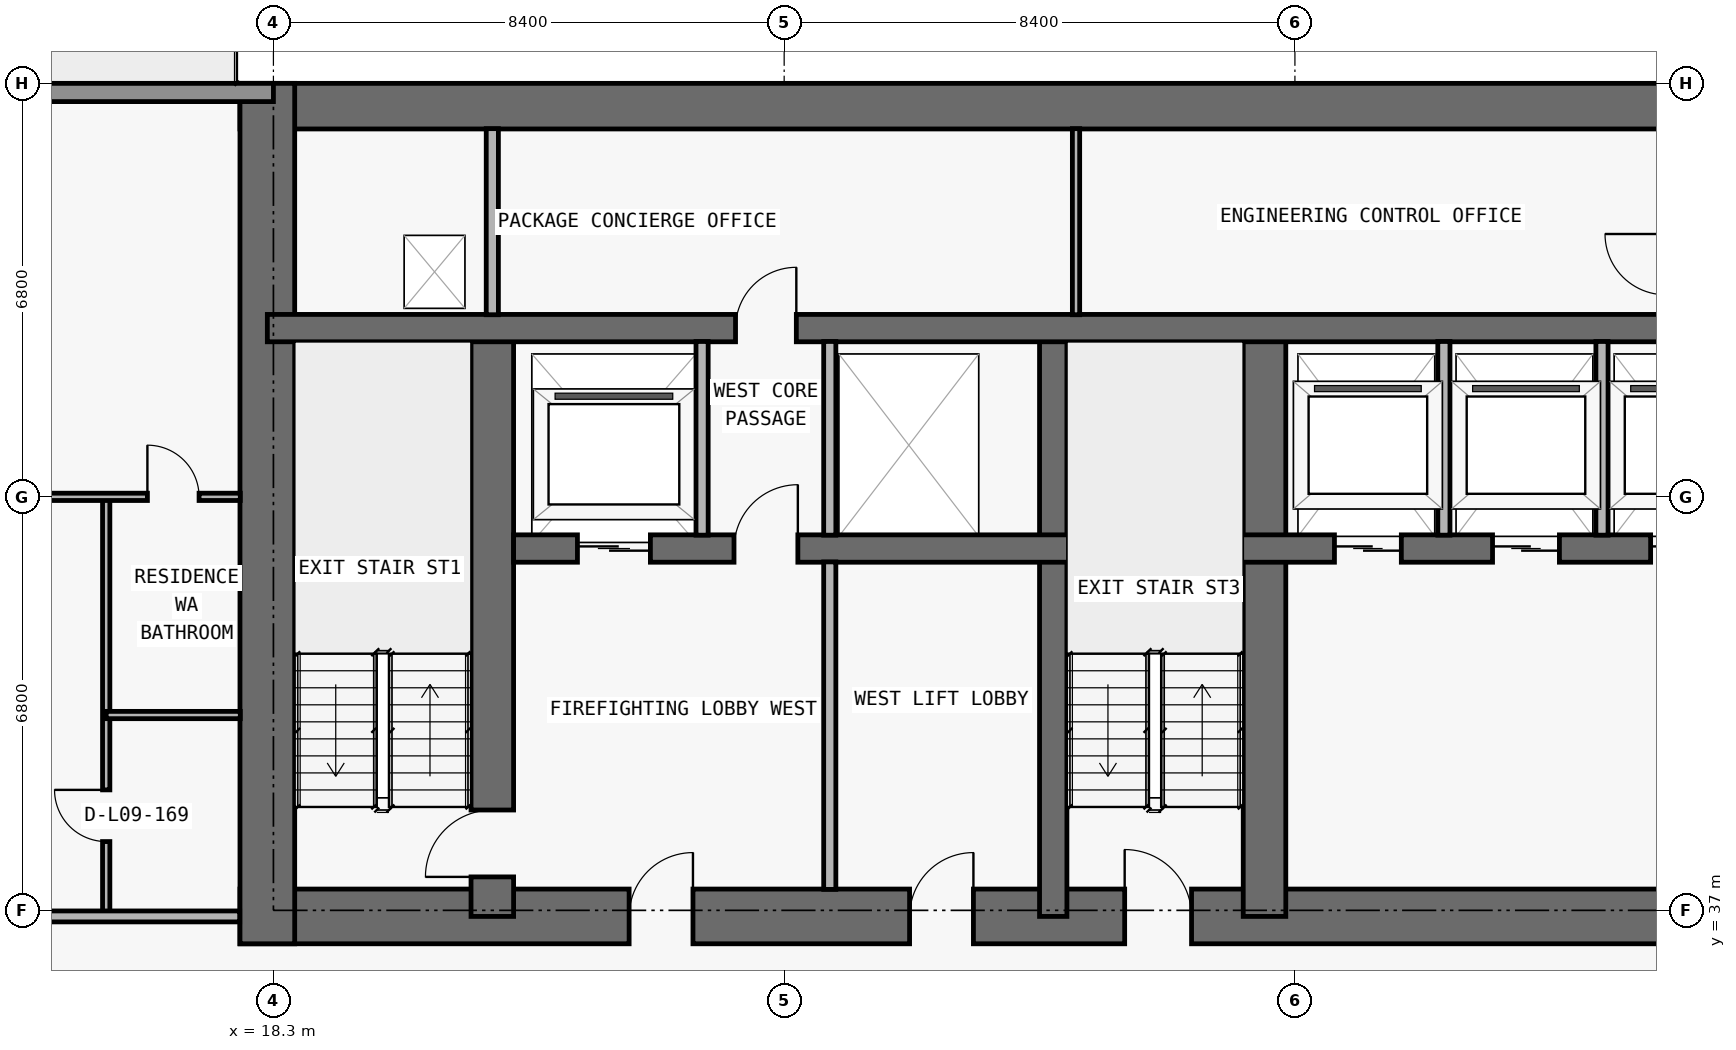
"""IFC4 building model, lengths in metres.
Left out: names, types, materials, properties, quantities, classifications, styles, units other than length and angle.
Written with IfcOpenShell. Run it as: python <this file> out.ifc"""

import sys

from ifc_helpers import new_model, si_unit, direction, frame, frame_2d, origin, place, context, subcontext, project, spatial, rectangle, extrude, element, fill, save


model = new_model("IFC4")
c1 = context("Model", 3, precision=1e-05, world=origin(), true_north=direction((0.0, 1.0)))
c2 = subcontext(c1, "Body", "Model", "MODEL_VIEW")
j1 = project(units=[si_unit("LENGTHUNIT", "METRE"), si_unit("PLANEANGLEUNIT", "RADIAN")], contexts=[c1])
p1 = place(None, origin())
s1 = spatial("IfcSite", under=j1, at=p1, CompositionType="ELEMENT")
p2 = place(p1, origin())
s2 = spatial("IfcBuilding", under=s1, at=p2, CompositionType="ELEMENT")
p3 = place(p2, frame((0.0, 0.0, 39.9)))
s3 = spatial("IfcBuildingStorey", under=s2, at=p3, CompositionType="ELEMENT", Elevation=39.9)
p4 = place(p3, frame((17.75, 36.9, 0.0), z_axis=(0.0, 0.0, 1.0), x_axis=(1.0, 0.0, 0.0)))
e1 = element("IfcWall", 1, at=p4, inside=s3, PredefinedType="SHEAR", context=c2, shape_type="SweptSolid", body=[
    extrude(rectangle(XDim=42.3, YDim=0.9, at=frame_2d((21.15, 0.0))), origin(), (0.0, 0.0, 1.0), 3.05),
])
p5 = place(p4, frame((14.55, 0.0, 0.0)))
e2 = element("IfcOpeningElement", 2, at=p5, cuts=e1, PredefinedType="OPENING", context=c2, shape_type="SweptSolid", body=[
    extrude(rectangle(XDim=1.1, YDim=2.15, at=frame_2d((0.55, 1.075))), frame((0.0, 0.46, 0.0), z_axis=(0.0, -1.0, 0.0), x_axis=(1.0, 0.0, 0.0)), (0.0, 0.0, 1.0), 0.92),
])
p6 = place(p4, frame((6.4, 0.0, 0.0)))
e3 = element("IfcOpeningElement", 3, at=p6, cuts=e1, PredefinedType="OPENING", context=c2, shape_type="SweptSolid", body=[
    extrude(rectangle(XDim=1.05, YDim=2.15, at=frame_2d((0.525, 1.075))), frame((0.0, 0.46, 0.0), z_axis=(0.0, -1.0, 0.0), x_axis=(1.0, 0.0, 0.0)), (0.0, 0.0, 1.0), 0.92),
])
p7 = place(p4, frame((34.9, 0.0, 0.0)))
e4 = element("IfcOpeningElement", 4, at=p7, cuts=e1, PredefinedType="OPENING", context=c2, shape_type="SweptSolid", body=[
    extrude(rectangle(XDim=1.05, YDim=2.15, at=frame_2d((0.525, 1.075))), frame((0.0, 0.46, 0.0), z_axis=(0.0, -1.0, 0.0), x_axis=(1.0, 0.0, 0.0)), (0.0, 0.0, 1.0), 0.92),
])
p8 = place(p4, frame((11.012, 0.0, 0.0)))
e5 = element("IfcOpeningElement", 5, at=p8, cuts=e1, PredefinedType="OPENING", context=c2, shape_type="SweptSolid", body=[
    extrude(rectangle(XDim=1.05, YDim=2.15, at=frame_2d((0.525, 1.075))), frame((0.0, 0.46, 0.0), z_axis=(0.0, -1.0, 0.0), x_axis=(1.0, 0.0, 0.0)), (0.0, 0.0, 1.0), 0.92),
])
p9 = place(p4, frame((24.25, 0.0, 0.0)))
e6 = element("IfcOpeningElement", 6, at=p9, cuts=e1, PredefinedType="OPENING", context=c2, shape_type="SweptSolid", body=[
    extrude(rectangle(XDim=1.05, YDim=2.15, at=frame_2d((0.525, 1.075))), frame((0.0, 0.46, 0.0), z_axis=(0.0, -1.0, 0.0), x_axis=(1.0, 0.0, 0.0)), (0.0, 0.0, 1.0), 0.92),
])
p10 = place(p3, frame((17.75, 50.225, 0.0), z_axis=(0.0, 0.0, 1.0), x_axis=(1.0, 0.0, 0.0)))
e7 = element("IfcWall", 7, at=p10, inside=s3, PredefinedType="SHEAR", context=c2, shape_type="SweptSolid", body=[
    extrude(rectangle(XDim=42.3, YDim=0.75, at=frame_2d((21.15, 0.0))), origin(), (0.0, 0.0, 1.0), 3.05),
])
p11 = place(p3, frame((18.2, 36.45, 0.0), z_axis=(0.0, 0.0, 1.0), x_axis=(0.0, 1.0, 0.0)))
e8 = element("IfcWall", 8, at=p11, inside=s3, PredefinedType="SHEAR", context=c2, shape_type="SweptSolid", body=[
    extrude(rectangle(XDim=14.15, YDim=0.9, at=frame_2d((7.075, 0.0))), origin(), (0.0, 0.0, 1.0), 3.05),
])
p12 = place(p3, frame((21.9, 36.9, 0.0), z_axis=(0.0, 0.0, 1.0), x_axis=(0.0, 1.0, 0.0)))
e9 = element("IfcWall", 9, at=p12, inside=s3, PredefinedType="SHEAR", context=c2, shape_type="SweptSolid", body=[
    extrude(rectangle(XDim=9.675, YDim=0.7, at=frame_2d((4.837, 0.0))), origin(), (0.0, 0.0, 1.0), 3.05),
])
p13 = place(p12, frame((0.65, 0.0, 0.0)))
e10 = element("IfcOpeningElement", 10, at=p13, cuts=e9, PredefinedType="OPENING", context=c2, shape_type="SweptSolid", body=[
    extrude(rectangle(XDim=1.1, YDim=2.15, at=frame_2d((0.55, 1.075))), frame((0.0, 0.36, 0.0), z_axis=(0.0, -1.0, 0.0), x_axis=(1.0, 0.0, 0.0)), (0.0, 0.0, 1.0), 0.72),
])
p14 = place(p3, frame((31.125, 36.9, 0.0), z_axis=(0.0, 0.0, 1.0), x_axis=(0.0, 1.0, 0.0)))
e11 = element("IfcWall", 11, at=p14, inside=s3, PredefinedType="SHEAR", context=c2, shape_type="SweptSolid", body=[
    extrude(rectangle(XDim=9.675, YDim=0.45, at=frame_2d((4.837, 0.0))), origin(), (0.0, 0.0, 1.0), 3.05),
])
p15 = place(p3, frame((34.6, 36.9, 0.0), z_axis=(0.0, 0.0, 1.0), x_axis=(0.0, 1.0, 0.0)))
e12 = element("IfcWall", 12, at=p15, inside=s3, PredefinedType="SHEAR", context=c2, shape_type="SweptSolid", body=[
    extrude(rectangle(XDim=9.675, YDim=0.7, at=frame_2d((4.837, 0.0))), origin(), (0.0, 0.0, 1.0), 3.05),
])
p16 = place(p3, frame((22.25, 42.95, 0.0), z_axis=(0.0, 0.0, 1.0), x_axis=(1.0, 0.0, 0.0)))
e13 = element("IfcWall", 13, at=p16, inside=s3, PredefinedType="SHEAR", context=c2, shape_type="SweptSolid", body=[
    extrude(rectangle(XDim=33.3, YDim=0.45, at=frame_2d((16.65, 0.0))), origin(), (0.0, 0.0, 1.0), 3.05),
])
p17 = place(p16, frame((1.05, 0.0, 0.0)))
e14 = element("IfcOpeningElement", 14, at=p17, cuts=e13, PredefinedType="OPENING", context=c2, shape_type="SweptSolid", body=[
    extrude(rectangle(XDim=1.2, YDim=2.2, at=frame_2d((0.6, 1.1))), frame((0.0, 0.235, 0.0), z_axis=(0.0, -1.0, 0.0), x_axis=(1.0, 0.0, 0.0)), (0.0, 0.0, 1.0), 0.47),
])
p18 = place(p16, frame((31.05, 0.0, 0.0)))
e15 = element("IfcOpeningElement", 15, at=p18, cuts=e13, PredefinedType="OPENING", context=c2, shape_type="SweptSolid", body=[
    extrude(rectangle(XDim=1.2, YDim=2.2, at=frame_2d((0.6, 1.1))), frame((0.0, 0.235, 0.0), z_axis=(0.0, -1.0, 0.0), x_axis=(1.0, 0.0, 0.0)), (0.0, 0.0, 1.0), 0.47),
])
p19 = place(p16, frame((13.5, 0.0, 0.0)))
e16 = element("IfcOpeningElement", 16, at=p19, cuts=e13, PredefinedType="OPENING", context=c2, shape_type="SweptSolid", body=[
    extrude(rectangle(XDim=1.1, YDim=2.2, at=frame_2d((0.55, 1.1))), frame((0.0, 0.235, 0.0), z_axis=(0.0, -1.0, 0.0), x_axis=(1.0, 0.0, 0.0)), (0.0, 0.0, 1.0), 0.47),
])
p20 = place(p16, frame((16.1, 0.0, 0.0)))
e17 = element("IfcOpeningElement", 17, at=p20, cuts=e13, PredefinedType="OPENING", context=c2, shape_type="SweptSolid", body=[
    extrude(rectangle(XDim=1.1, YDim=2.2, at=frame_2d((0.55, 1.1))), frame((0.0, 0.235, 0.0), z_axis=(0.0, -1.0, 0.0), x_axis=(1.0, 0.0, 0.0)), (0.0, 0.0, 1.0), 0.47),
])
p21 = place(p16, frame((18.7, 0.0, 0.0)))
e18 = element("IfcOpeningElement", 18, at=p21, cuts=e13, PredefinedType="OPENING", context=c2, shape_type="SweptSolid", body=[
    extrude(rectangle(XDim=1.1, YDim=2.2, at=frame_2d((0.55, 1.1))), frame((0.0, 0.235, 0.0), z_axis=(0.0, -1.0, 0.0), x_axis=(1.0, 0.0, 0.0)), (0.0, 0.0, 1.0), 0.47),
])
p22 = place(p16, frame((3.625, 0.0, 0.0)))
e19 = element("IfcOpeningElement", 19, at=p22, cuts=e13, PredefinedType="OPENING", context=c2, shape_type="SweptSolid", body=[
    extrude(rectangle(XDim=1.05, YDim=2.15, at=frame_2d((0.525, 1.075))), frame((0.0, 0.235, 0.0), z_axis=(0.0, -1.0, 0.0), x_axis=(1.0, 0.0, 0.0)), (0.0, 0.0, 1.0), 0.47),
])
p23 = place(p16, frame((28.675, 0.0, 0.0)))
e20 = element("IfcOpeningElement", 20, at=p23, cuts=e13, PredefinedType="OPENING", context=c2, shape_type="SweptSolid", body=[
    extrude(rectangle(XDim=1.05, YDim=2.15, at=frame_2d((0.525, 1.075))), frame((0.0, 0.235, 0.0), z_axis=(0.0, -1.0, 0.0), x_axis=(1.0, 0.0, 0.0)), (0.0, 0.0, 1.0), 0.47),
])
p24 = place(p3, frame((18.2, 46.575, 0.0), z_axis=(0.0, 0.0, 1.0), x_axis=(1.0, 0.0, 0.0)))
e21 = element("IfcWall", 21, at=p24, inside=s3, PredefinedType="SHEAR", context=c2, shape_type="SweptSolid", body=[
    extrude(rectangle(XDim=41.4, YDim=0.45, at=frame_2d((20.7, 0.0))), origin(), (0.0, 0.0, 1.0), 3.05),
])
p25 = place(p24, frame((7.7, 0.0, 0.0)))
e22 = element("IfcOpeningElement", 22, at=p25, cuts=e21, PredefinedType="OPENING", context=c2, shape_type="SweptSolid", body=[
    extrude(rectangle(XDim=1.0, YDim=2.2, at=frame_2d((0.5, 1.1))), frame((0.0, 0.235, 0.0), z_axis=(0.0, -1.0, 0.0), x_axis=(1.0, 0.0, 0.0)), (0.0, 0.0, 1.0), 0.47),
])
p26 = place(p24, frame((32.725, 0.0, 0.0)))
e23 = element("IfcOpeningElement", 23, at=p26, cuts=e21, PredefinedType="OPENING", context=c2, shape_type="SweptSolid", body=[
    extrude(rectangle(XDim=1.05, YDim=2.15, at=frame_2d((0.525, 1.075))), frame((0.0, 0.235, 0.0), z_axis=(0.0, -1.0, 0.0), x_axis=(1.0, 0.0, 0.0)), (0.0, 0.0, 1.0), 0.47),
])
p27 = place(p3, frame((5.1, 50.45, 0.0), z_axis=(0.0, 0.0, 1.0), x_axis=(1.0, 0.0, 0.0)))
e24 = element("IfcWall", 24, at=p27, inside=s3, PredefinedType="STANDARD", context=c2, shape_type="SweptSolid", body=[
    extrude(rectangle(XDim=13.2, YDim=0.3, at=frame_2d((6.6, 0.0))), origin(), (0.0, 0.0, 1.0), 3.05),
])
p28 = place(p27, frame((5.6, 0.0, 0.0)))
e25 = element("IfcOpeningElement", 25, at=p28, cuts=e24, PredefinedType="OPENING", context=c2, shape_type="SweptSolid", body=[
    extrude(rectangle(XDim=2.0, YDim=2.3, at=frame_2d((1.0, 1.15))), frame((0.0, 0.16, 0.0), z_axis=(0.0, -1.0, 0.0), x_axis=(1.0, 0.0, 0.0)), (0.0, 0.0, 1.0), 0.32),
])
p29 = place(p3, frame((15.55, 36.9, 0.0), z_axis=(0.0, 0.0, 1.0), x_axis=(0.0, 1.0, 0.0)))
e26 = element("IfcWall", 26, at=p29, inside=s3, PredefinedType="PARTITIONING", context=c2, shape_type="SweptSolid", body=[
    extrude(rectangle(XDim=6.9, YDim=0.12, at=frame_2d((3.45, 0.0))), origin(), (0.0, 0.0, 1.0), 3.05),
])
p30 = place(p29, frame((1.231, 0.0, 0.0)))
e27 = element("IfcOpeningElement", 27, at=p30, cuts=e26, PredefinedType="OPENING", context=c2, shape_type="SweptSolid", body=[
    extrude(rectangle(XDim=0.85, YDim=2.1, at=frame_2d((0.425, 1.05))), frame((0.0, 0.07, 0.0), z_axis=(0.0, -1.0, 0.0), x_axis=(1.0, 0.0, 0.0)), (0.0, 0.0, 1.0), 0.14),
])
p31 = place(p3, frame((21.9, 46.795, 0.0), z_axis=(0.0, 0.0, 1.0), x_axis=(0.0, 1.0, 0.0)))
e28 = element("IfcWall", 28, at=p31, inside=s3, PredefinedType="PARTITIONING", context=c2, shape_type="SweptSolid", body=[
    extrude(rectangle(XDim=3.06, YDim=0.2, at=frame_2d((1.53, 0.0))), origin(), (0.0, 0.0, 1.0), 3.05),
])
p32 = place(p3, frame((25.35, 43.17, 0.0), z_axis=(0.0, 0.0, 1.0), x_axis=(0.0, 1.0, 0.0)))
e29 = element("IfcWall", 29, at=p32, inside=s3, PredefinedType="PARTITIONING", context=c2, shape_type="SweptSolid", body=[
    extrude(rectangle(XDim=3.185, YDim=0.2, at=frame_2d((1.593, 0.0))), origin(), (0.0, 0.0, 1.0), 3.05),
])
p33 = place(p3, frame((27.45, 37.345, 0.0), z_axis=(0.0, 0.0, 1.0), x_axis=(0.0, 1.0, 0.0)))
e30 = element("IfcWall", 30, at=p33, inside=s3, PredefinedType="PARTITIONING", context=c2, shape_type="SweptSolid", body=[
    extrude(rectangle(XDim=5.385, YDim=0.2, at=frame_2d((2.692, 0.0))), origin(), (0.0, 0.0, 1.0), 3.05),
])
p34 = place(p3, frame((27.45, 43.17, 0.0), z_axis=(0.0, 0.0, 1.0), x_axis=(0.0, 1.0, 0.0)))
e31 = element("IfcWall", 31, at=p34, inside=s3, PredefinedType="PARTITIONING", context=c2, shape_type="SweptSolid", body=[
    extrude(rectangle(XDim=3.185, YDim=0.2, at=frame_2d((1.593, 0.0))), origin(), (0.0, 0.0, 1.0), 3.05),
])
p35 = place(p3, frame((31.5, 46.795, 0.0), z_axis=(0.0, 0.0, 1.0), x_axis=(0.0, 1.0, 0.0)))
e32 = element("IfcWall", 32, at=p35, inside=s3, PredefinedType="PARTITIONING", context=c2, shape_type="SweptSolid", body=[
    extrude(rectangle(XDim=3.06, YDim=0.12, at=frame_2d((1.53, 0.0))), origin(), (0.0, 0.0, 1.0), 3.05),
])
for number, where, z_axis, x_axis in (
    (33, (37.55, 43.17, 0.0), (0.0, 0.0, 1.0), (0.0, 1.0, 0.0)),
    (34, (40.15, 43.17, 0.0), (0.0, 0.0, 1.0), (0.0, 1.0, 0.0)),
):
    element("IfcWall", number, at=place(p3, frame(where, z_axis=z_axis, x_axis=x_axis)), inside=s3, PredefinedType="PARTITIONING", context=c2, shape_type="SweptSolid", body=[
        extrude(rectangle(XDim=3.185, YDim=0.2, at=frame_2d((1.593, 0.0))), origin(), (0.0, 0.0, 1.0), 3.05),
    ])
p36 = place(p3, frame((5.1, 36.9, 0.0), z_axis=(0.0, 0.0, 1.0), x_axis=(1.0, 0.0, 0.0)))
e35 = element("IfcWall", 35, at=p36, inside=s3, PredefinedType="PARTITIONING", context=c2, shape_type="SweptSolid", body=[
    extrude(rectangle(XDim=12.645, YDim=0.18, at=frame_2d((6.323, 0.0))), origin(), (0.0, 0.0, 1.0), 3.05),
])
p37 = place(p36, frame((7.125, 0.0, 0.0)))
e36 = element("IfcOpeningElement", 36, at=p37, cuts=e35, PredefinedType="OPENING", context=c2, shape_type="SweptSolid", body=[
    extrude(rectangle(XDim=1.0, YDim=2.2, at=frame_2d((0.5, 1.1))), frame((0.0, 0.1, 0.0), z_axis=(0.0, -1.0, 0.0), x_axis=(1.0, 0.0, 0.0)), (0.0, 0.0, 1.0), 0.2),
])
p38 = place(p3, frame((15.55, 40.212, 0.0), z_axis=(0.0, 0.0, 1.0), x_axis=(1.0, 0.0, 0.0)))
e37 = element("IfcWall", 37, at=p38, inside=s3, PredefinedType="PARTITIONING", context=c2, shape_type="SweptSolid", body=[
    extrude(rectangle(XDim=2.205, YDim=0.12, at=frame_2d((1.103, 0.0))), origin(), (0.0, 0.0, 1.0), 3.05),
])
p39 = place(p3, frame((1.795, 43.8, 0.0), z_axis=(0.0, 0.0, 1.0), x_axis=(1.0, 0.0, 0.0)))
e38 = element("IfcWall", 38, at=p39, inside=s3, PredefinedType="PARTITIONING", context=c2, shape_type="SweptSolid", body=[
    extrude(rectangle(XDim=15.96, YDim=0.12, at=frame_2d((7.98, 0.0))), origin(), (0.0, 0.0, 1.0), 2.339),
])
p40 = place(p39, frame((5.255, 0.0, 0.0)))
e39 = element("IfcOpeningElement", 39, at=p40, cuts=e38, PredefinedType="OPENING", context=c2, shape_type="SweptSolid", body=[
    extrude(rectangle(XDim=0.9, YDim=2.15, at=frame_2d((0.45, 1.075))), frame((0.0, 0.07, 0.0), z_axis=(0.0, -1.0, 0.0), x_axis=(1.0, 0.0, 0.0)), (0.0, 0.0, 1.0), 0.14),
])
p41 = place(p39, frame((10.48, 0.0, 0.0)))
e40 = element("IfcOpeningElement", 40, at=p41, cuts=e38, PredefinedType="OPENING", context=c2, shape_type="SweptSolid", body=[
    extrude(rectangle(XDim=0.9, YDim=2.15, at=frame_2d((0.45, 1.075))), frame((0.0, 0.07, 0.0), z_axis=(0.0, -1.0, 0.0), x_axis=(1.0, 0.0, 0.0)), (0.0, 0.0, 1.0), 0.14),
])
p42 = place(p39, frame((14.433, 0.0, 0.0)))
e41 = element("IfcOpeningElement", 41, at=p42, cuts=e38, PredefinedType="OPENING", context=c2, shape_type="SweptSolid", body=[
    extrude(rectangle(XDim=0.85, YDim=2.1, at=frame_2d((0.425, 1.05))), frame((0.0, 0.07, 0.0), z_axis=(0.0, -1.0, 0.0), x_axis=(1.0, 0.0, 0.0)), (0.0, 0.0, 1.0), 0.14),
])
p43 = place(p17, origin())
e42 = element("IfcDoor", 42, at=p43, inside=s3, OperationType="DOUBLE_DOOR_SLIDING", PredefinedType="DOOR", context=c2, shape_type="SweptSolid", body=[
    extrude(rectangle(XDim=1.2, YDim=2.2, at=frame_2d((0.6, 1.1))), frame((0.0, 0.025, 0.0), z_axis=(0.0, -1.0, 0.0), x_axis=(1.0, 0.0, 0.0)), (0.0, 0.0, 1.0), 0.05),
])
fill(e14, e42)
p44 = place(p19, origin())
e43 = element("IfcDoor", 43, at=p44, inside=s3, OperationType="DOUBLE_DOOR_SLIDING", PredefinedType="DOOR", context=c2, shape_type="SweptSolid", body=[
    extrude(rectangle(XDim=1.1, YDim=2.2, at=frame_2d((0.55, 1.1))), frame((0.0, 0.025, 0.0), z_axis=(0.0, -1.0, 0.0), x_axis=(1.0, 0.0, 0.0)), (0.0, 0.0, 1.0), 0.05),
])
fill(e16, e43)
p45 = place(p20, origin())
e44 = element("IfcDoor", 44, at=p45, inside=s3, OperationType="DOUBLE_DOOR_SLIDING", PredefinedType="DOOR", context=c2, shape_type="SweptSolid", body=[
    extrude(rectangle(XDim=1.1, YDim=2.2, at=frame_2d((0.55, 1.1))), frame((0.0, 0.025, 0.0), z_axis=(0.0, -1.0, 0.0), x_axis=(1.0, 0.0, 0.0)), (0.0, 0.0, 1.0), 0.05),
])
fill(e17, e44)
p46 = place(p21, origin())
e45 = element("IfcDoor", 45, at=p46, inside=s3, OperationType="DOUBLE_DOOR_SLIDING", PredefinedType="DOOR", context=c2, shape_type="SweptSolid", body=[
    extrude(rectangle(XDim=1.1, YDim=2.2, at=frame_2d((0.55, 1.1))), frame((0.0, 0.025, 0.0), z_axis=(0.0, -1.0, 0.0), x_axis=(1.0, 0.0, 0.0)), (0.0, 0.0, 1.0), 0.05),
])
fill(e18, e45)
p47 = place(p5, origin())
e46 = element("IfcDoor", 46, at=p47, inside=s3, OperationType="SINGLE_SWING_LEFT", PredefinedType="DOOR", context=c2, shape_type="SweptSolid", body=[
    extrude(rectangle(XDim=1.1, YDim=2.15, at=frame_2d((0.55, 1.075))), frame((0.0, 0.025, 0.0), z_axis=(0.0, -1.0, 0.0), x_axis=(1.0, 0.0, 0.0)), (0.0, 0.0, 1.0), 0.05),
])
fill(e2, e46)
p48 = place(p6, origin())
e47 = element("IfcDoor", 47, at=p48, inside=s3, OperationType="SINGLE_SWING_RIGHT", PredefinedType="DOOR", context=c2, shape_type="SweptSolid", body=[
    extrude(rectangle(XDim=1.05, YDim=2.15, at=frame_2d((0.525, 1.075))), frame((0.0, 0.025, 0.0), z_axis=(0.0, -1.0, 0.0), x_axis=(1.0, 0.0, 0.0)), (0.0, 0.0, 1.0), 0.05),
])
fill(e3, e47)
p49 = place(p13, origin())
e48 = element("IfcDoor", 48, at=p49, inside=s3, OperationType="SINGLE_SWING_LEFT", PredefinedType="DOOR", context=c2, shape_type="SweptSolid", body=[
    extrude(rectangle(XDim=1.1, YDim=2.15, at=frame_2d((0.55, 1.075))), frame((0.0, 0.025, 0.0), z_axis=(0.0, -1.0, 0.0), x_axis=(1.0, 0.0, 0.0)), (0.0, 0.0, 1.0), 0.05),
])
fill(e10, e48)
p50 = place(p22, origin())
e49 = element("IfcDoor", 49, at=p50, inside=s3, OperationType="SINGLE_SWING_RIGHT", PredefinedType="DOOR", context=c2, shape_type="SweptSolid", body=[
    extrude(rectangle(XDim=1.05, YDim=2.15, at=frame_2d((0.525, 1.075))), frame((0.0, 0.025, 0.0), z_axis=(0.0, -1.0, 0.0), x_axis=(1.0, 0.0, 0.0)), (0.0, 0.0, 1.0), 0.05),
])
fill(e19, e49)
p51 = place(p8, origin())
e50 = element("IfcDoor", 50, at=p51, inside=s3, OperationType="SINGLE_SWING_RIGHT", PredefinedType="DOOR", context=c2, shape_type="SweptSolid", body=[
    extrude(rectangle(XDim=1.05, YDim=2.15, at=frame_2d((0.525, 1.075))), frame((0.0, 0.025, 0.0), z_axis=(0.0, -1.0, 0.0), x_axis=(1.0, 0.0, 0.0)), (0.0, 0.0, 1.0), 0.05),
])
fill(e5, e50)
p52 = place(p25, origin())
e51 = element("IfcDoor", 51, at=p52, inside=s3, OperationType="SINGLE_SWING_RIGHT", PredefinedType="DOOR", context=c2, shape_type="SweptSolid", body=[
    extrude(rectangle(XDim=1.0, YDim=2.2, at=frame_2d((0.5, 1.1))), frame((0.0, 0.025, 0.0), z_axis=(0.0, -1.0, 0.0), x_axis=(1.0, 0.0, 0.0)), (0.0, 0.0, 1.0), 0.05),
])
fill(e22, e51)
p53 = place(p30, origin())
e52 = element("IfcDoor", 52, at=p53, inside=s3, OperationType="SINGLE_SWING_RIGHT", PredefinedType="DOOR", context=c2, shape_type="SweptSolid", body=[
    extrude(rectangle(XDim=0.85, YDim=2.1, at=frame_2d((0.425, 1.05))), frame((0.0, 0.025, 0.0), z_axis=(0.0, -1.0, 0.0), x_axis=(1.0, 0.0, 0.0)), (0.0, 0.0, 1.0), 0.05),
])
fill(e27, e52)
p54 = place(p42, origin())
e53 = element("IfcDoor", 53, at=p54, inside=s3, OperationType="SINGLE_SWING_LEFT", PredefinedType="DOOR", context=c2, shape_type="SweptSolid", body=[
    extrude(rectangle(XDim=0.85, YDim=2.1, at=frame_2d((0.425, 1.05))), frame((0.0, 0.025, 0.0), z_axis=(0.0, -1.0, 0.0), x_axis=(1.0, 0.0, 0.0)), (0.0, 0.0, 1.0), 0.05),
])
fill(e41, e53)
save(model, sys.argv[1])
